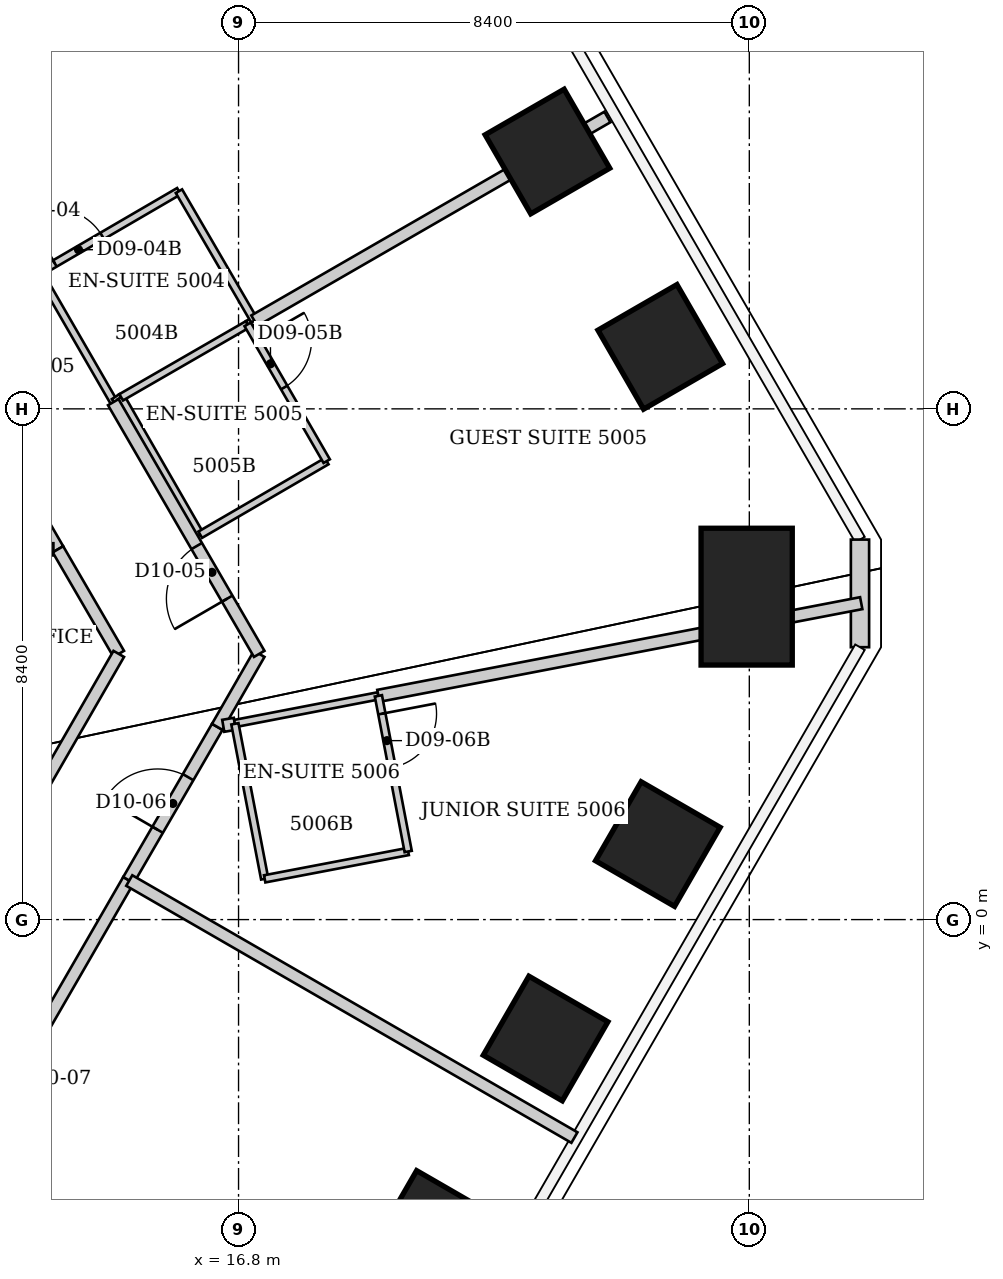
"""IFC4 building model, lengths in metres.
Left out: names, types, materials, properties, quantities, classifications, styles, units other than length and angle.
Written with IfcOpenShell. Run it as: python <this file> out.ifc"""

import sys

from ifc_helpers import new_model, si_unit, direction, frame, frame_2d, origin, origin_2d, place, context, subcontext, project, spatial, rectangle, extrude, element, fill, save


model = new_model("IFC4")
c1 = context("Model", 3, precision=1e-05, world=origin(), true_north=direction((0.0, 1.0)))
c2 = subcontext(c1, "Body", "Model", "MODEL_VIEW")
j1 = project(units=[si_unit("LENGTHUNIT", "METRE"), si_unit("PLANEANGLEUNIT", "RADIAN")], contexts=[c1])
p1 = place(None, origin())
s1 = spatial("IfcSite", under=j1, at=p1, CompositionType="ELEMENT")
p2 = place(p1, origin())
s2 = spatial("IfcBuilding", under=s1, at=p2, CompositionType="ELEMENT")
p3 = place(p2, frame((0.0, 0.0, 202.2)))
s3 = spatial("IfcBuildingStorey", under=s2, at=p3, CompositionType="ELEMENT", Elevation=202.2)
for number, where, z_axis, x_axis in (
    (1, (21.88, 12.633, 0.0), (0.0, 0.0, 1.0), (0.866, 0.5, 0.0)),
    (2, (23.735, 9.419, 0.0), (0.0, 0.0, 1.0), (0.866, 0.5, 0.0)),
):
    element("IfcColumn", number, at=place(p3, frame(where, z_axis=z_axis, x_axis=x_axis)), inside=s3, PredefinedType="COLUMN", context=c2, shape_type="SweptSolid", body=[
        extrude(rectangle(XDim=1.5, YDim=1.5, at=origin_2d()), origin(), (0.0, 0.0, 1.0), 3.8),
    ])
p4 = place(p3, frame((25.156, 5.311, 0.0), z_axis=(0.0, 0.0, 1.0), x_axis=(1.0, 0.0, 0.0)))
e3 = element("IfcColumn", 3, at=p4, inside=s3, PredefinedType="COLUMN", context=c2, shape_type="SweptSolid", body=[
    extrude(rectangle(XDim=1.5, YDim=2.25, at=origin_2d()), origin(), (0.0, 0.0, 1.0), 3.8),
])
for number, where, z_axis, x_axis in (
    (4, (23.696, 1.242, 0.0), (0.0, 0.0, 1.0), (0.866, -0.5, 0.0)),
    (5, (21.85, -1.956, 0.0), (0.0, 0.0, 1.0), (0.866, -0.5, 0.0)),
    (6, (20.003, -5.153, 0.0), (0.0, 0.0, 1.0), (0.866, -0.5, 0.0)),
):
    element("IfcColumn", number, at=place(p3, frame(where, z_axis=z_axis, x_axis=x_axis)), inside=s3, PredefinedType="COLUMN", context=c2, shape_type="SweptSolid", body=[
        extrude(rectangle(XDim=1.5, YDim=1.5, at=origin_2d()), origin(), (0.0, 0.0, 1.0), 3.8),
    ])
p5 = place(p3, frame((27.02, 6.25, 0.0), z_axis=(0.0, 0.0, 1.0), x_axis=(0.0, -1.0, 0.0)))
e7 = element("IfcWall", 7, at=p5, inside=s3, PredefinedType="SOLIDWALL", context=c2, shape_type="SweptSolid", body=[
    extrude(rectangle(XDim=1.77, YDim=0.3, at=frame_2d((0.885, 0.0))), origin(), (0.0, 0.0, 1.0), 3.64),
])
p6 = place(p3, frame((11.04, 12.751, 0.0), z_axis=(0.0, 0.0, 1.0), x_axis=(0.654384042683, 0.756162366613, 0.0)))
e8 = element("IfcWall", 8, at=p6, inside=s3, PredefinedType="PARTITIONING", context=c2, shape_type="SweptSolid", body=[
    extrude(rectangle(XDim=10.667, YDim=0.2, at=frame_2d((5.333, 0.0))), origin(), (0.0, 0.0, 1.0), 3.64),
])
p7 = place(p3, frame((11.19, 10.66, 0.0), z_axis=(0.0, 0.0, 1.0), x_axis=(0.500248310865, -0.865881993967, 0.0)))
e9 = element("IfcWall", 9, at=p7, inside=s3, PredefinedType="PARTITIONING", context=c2, shape_type="SweptSolid", body=[
    extrude(rectangle(XDim=5.278, YDim=0.2, at=frame_2d((2.639, 0.0))), origin(), (0.0, 0.0, 1.0), 3.64),
])
p8 = place(p7, frame((2.089, 0.0, 0.0)))
e10 = element("IfcOpeningElement", 10, at=p8, cuts=e9, PredefinedType="OPENING", context=c2, shape_type="SweptSolid", body=[
    extrude(rectangle(XDim=1.1, YDim=2.2, at=frame_2d((0.55, 1.1))), frame((0.0, 0.1, 0.0), z_axis=(0.0, -1.0, 0.0), x_axis=(1.0, 0.0, 0.0)), (0.0, 0.0, 1.0), 0.2),
])
p9 = place(p3, frame((11.22, -5.88, 0.0), z_axis=(0.0, 0.0, 1.0), x_axis=(0.500004606796, 0.866022744033, 0.0)))
e11 = element("IfcWall", 11, at=p9, inside=s3, PredefinedType="PARTITIONING", context=c2, shape_type="SweptSolid", body=[
    extrude(rectangle(XDim=7.54, YDim=0.2, at=frame_2d((3.77, 0.0))), origin(), (0.0, 0.0, 1.0), 3.64),
])
p10 = place(p9, frame((3.27, 0.0, 0.0)))
e12 = element("IfcOpeningElement", 12, at=p10, cuts=e11, PredefinedType="OPENING", context=c2, shape_type="SweptSolid", body=[
    extrude(rectangle(XDim=1.0, YDim=2.13, at=frame_2d((0.5, 1.065))), frame((0.0, 0.1, 0.0), z_axis=(0.0, -1.0, 0.0), x_axis=(1.0, 0.0, 0.0)), (0.0, 0.0, 1.0), 0.2),
])
p11 = place(p3, frame((13.52, 10.64, 0.0), z_axis=(0.0, 0.0, 1.0), x_axis=(0.500046071023, -0.865998803033, 0.0)))
e13 = element("IfcWall", 13, at=p11, inside=s3, PredefinedType="PARTITIONING", context=c2, shape_type="SweptSolid", body=[
    extrude(rectangle(XDim=2.46, YDim=0.12, at=frame_2d((1.23, 0.0))), origin(), (0.0, 0.0, 1.0), 3.64),
])
p12 = place(p3, frame((13.755, 6.09, 0.0), z_axis=(0.0, 0.0, 1.0), x_axis=(-1.0, 0.0, 0.0)))
e14 = element("IfcWall", 14, at=p12, inside=s3, PredefinedType="PARTITIONING", context=c2, shape_type="SweptSolid", body=[
    extrude(rectangle(XDim=3.195, YDim=0.2, at=frame_2d((1.597, 0.0))), origin(), (0.0, 0.0, 1.0), 3.64),
])
p13 = place(p3, frame((13.83, 6.09, 0.0), z_axis=(0.0, 0.0, 1.0), x_axis=(0.502573539539, -0.864534462792, 0.0)))
e15 = element("IfcWall", 15, at=p13, inside=s3, PredefinedType="PARTITIONING", context=c2, shape_type="SweptSolid", body=[
    extrude(rectangle(XDim=1.99, YDim=0.2, at=frame_2d((0.995, 0.0))), origin(), (0.0, 0.0, 1.0), 3.64),
])
p14 = place(p3, frame((14.75, 8.51, 0.0), z_axis=(0.0, 0.0, 1.0), x_axis=(0.831528837533, 0.555481585969, 0.0)))
e16 = element("IfcWall", 16, at=p14, inside=s3, PredefinedType="PARTITIONING", context=c2, shape_type="SweptSolid", body=[
    extrude(rectangle(XDim=0.144, YDim=0.12, at=frame_2d((0.072, 0.0))), origin(), (0.0, 0.0, 1.0), 3.64),
])
p15 = place(p3, frame((14.83, 4.37, 0.0), z_axis=(0.0, 0.0, 1.0), x_axis=(-0.498775186059, -0.866731396554, 0.0)))
e17 = element("IfcWall", 17, at=p15, inside=s3, PredefinedType="PARTITIONING", context=c2, shape_type="SweptSolid", body=[
    extrude(rectangle(XDim=3.288, YDim=0.2, at=frame_2d((1.644, 0.0))), origin(), (0.0, 0.0, 1.0), 3.64),
])
p16 = place(p3, frame((14.87, 8.59, 0.0), z_axis=(0.0, 0.0, 1.0), x_axis=(0.498557331759, -0.866856728041, 0.0)))
e18 = element("IfcWall", 18, at=p16, inside=s3, PredefinedType="PARTITIONING", context=c2, shape_type="SweptSolid", body=[
    extrude(rectangle(XDim=2.607, YDim=0.12, at=frame_2d((1.304, 0.0))), origin(), (0.0, 0.0, 1.0), 3.64),
])
p17 = place(p3, frame((14.87, 8.59, 0.0), z_axis=(0.0, 0.0, 1.0), x_axis=(0.866177122335, 0.499737123639, 0.0)))
e19 = element("IfcWall", 19, at=p17, inside=s3, PredefinedType="PARTITIONING", context=c2, shape_type="SweptSolid", body=[
    extrude(rectangle(XDim=2.401, YDim=0.12, at=frame_2d((1.201, 0.0))), origin(), (0.0, 0.0, 1.0), 2.878),
])
p18 = place(p3, frame((14.99, 0.65, 0.0), z_axis=(0.0, 0.0, 1.0), x_axis=(0.501330358107, 0.865255957529, 0.0)))
e20 = element("IfcWall", 20, at=p18, inside=s3, PredefinedType="PARTITIONING", context=c2, shape_type="SweptSolid", body=[
    extrude(rectangle(XDim=2.912, YDim=0.2, at=frame_2d((1.456, 0.0))), origin(), (0.0, 0.0, 1.0), 3.64),
])
p19 = place(p18, frame((0.956, 0.0, 0.0)))
e21 = element("IfcOpeningElement", 21, at=p19, cuts=e20, PredefinedType="OPENING", context=c2, shape_type="SweptSolid", body=[
    extrude(rectangle(XDim=1.0, YDim=2.13, at=frame_2d((0.5, 1.065))), frame((0.0, 0.1, 0.0), z_axis=(0.0, -1.0, 0.0), x_axis=(1.0, 0.0, 0.0)), (0.0, 0.0, 1.0), 0.2),
])
p20 = place(p3, frame((15.82, 11.98, 0.0), z_axis=(0.0, 0.0, 1.0), x_axis=(-0.864041571379, -0.503420463359, 0.0)))
e22 = element("IfcWall", 22, at=p20, inside=s3, PredefinedType="PARTITIONING", context=c2, shape_type="SweptSolid", body=[
    extrude(rectangle(XDim=2.662, YDim=0.12, at=frame_2d((1.331, 0.0))), origin(), (0.0, 0.0, 1.0), 3.64),
])
p21 = place(p20, frame((1.462, 0.0, 0.0)))
e23 = element("IfcOpeningElement", 23, at=p21, cuts=e22, PredefinedType="OPENING", context=c2, shape_type="SweptSolid", body=[
    extrude(rectangle(XDim=0.9, YDim=2.03, at=frame_2d((0.45, 1.015))), frame((0.0, 0.06, 0.0), z_axis=(0.0, -1.0, 0.0), x_axis=(1.0, 0.0, 0.0)), (0.0, 0.0, 1.0), 0.12),
])
p22 = place(p3, frame((16.17, 6.33, 0.0), z_axis=(0.0, 0.0, 1.0), x_axis=(0.864396442809, 0.502810888564, 0.0)))
e24 = element("IfcWall", 24, at=p22, inside=s3, PredefinedType="PARTITIONING", context=c2, shape_type="SweptSolid", body=[
    extrude(rectangle(XDim=2.406, YDim=0.12, at=frame_2d((1.203, 0.0))), origin(), (0.0, 0.0, 1.0), 3.64),
])
p23 = place(p3, frame((16.45, 3.17, 0.0), z_axis=(0.0, 0.0, 1.0), x_axis=(0.49845455473, 0.866915830325, 0.0)))
e25 = element("IfcWall", 25, at=p23, inside=s3, PredefinedType="PARTITIONING", context=c2, shape_type="SweptSolid", body=[
    extrude(rectangle(XDim=1.384, YDim=0.2, at=frame_2d((0.692, 0.0))), origin(), (0.0, 0.0, 1.0), 3.64),
])
p24 = place(p3, frame((16.549, 3.187, 0.0), z_axis=(0.0, 0.0, 1.0), x_axis=(0.985496381106, 0.169696443175, 0.0)))
e26 = element("IfcWall", 26, at=p24, inside=s3, PredefinedType="PARTITIONING", context=c2, shape_type="SweptSolid", body=[
    extrude(rectangle(XDim=0.194, YDim=0.2, at=frame_2d((0.097, 0.0))), origin(), (0.0, 0.0, 1.0), 3.64),
])
p25 = place(p3, frame((16.739, 3.225, 0.0), z_axis=(0.0, 0.0, 1.0), x_axis=(0.981946287277, 0.189159955868, 0.0)))
e27 = element("IfcWall", 27, at=p25, inside=s3, PredefinedType="PARTITIONING", context=c2, shape_type="SweptSolid", body=[
    extrude(rectangle(XDim=2.405, YDim=0.12, at=frame_2d((1.202, 0.0))), origin(), (0.0, 0.0, 1.0), 3.64),
])
p26 = place(p3, frame((16.74, 3.22, 0.0), z_axis=(0.0, 0.0, 1.0), x_axis=(0.188697442844, -0.982035271802, 0.0)))
e28 = element("IfcWall", 28, at=p26, inside=s3, PredefinedType="PARTITIONING", context=c2, shape_type="SweptSolid", body=[
    extrude(rectangle(XDim=2.597, YDim=0.12, at=frame_2d((1.298, 0.0))), origin(), (0.0, 0.0, 1.0), 3.64),
])
p27 = place(p3, frame((16.95, 9.79, 0.0), z_axis=(0.0, 0.0, 1.0), x_axis=(0.877895572914, 0.478852130681, 0.0)))
e29 = element("IfcWall", 29, at=p27, inside=s3, PredefinedType="PARTITIONING", context=c2, shape_type="SweptSolid", body=[
    extrude(rectangle(XDim=0.125, YDim=0.12, at=frame_2d((0.063, 0.0))), origin(), (0.0, 0.0, 1.0), 3.64),
])
p28 = place(p3, frame((17.06, 9.85, 0.0), z_axis=(0.0, 0.0, 1.0), x_axis=(-0.503131731744, 0.864209731785, 0.0)))
e30 = element("IfcWall", 30, at=p28, inside=s3, PredefinedType="PARTITIONING", context=c2, shape_type="SweptSolid", body=[
    extrude(rectangle(XDim=2.465, YDim=0.12, at=frame_2d((1.232, 0.0))), origin(), (0.0, 0.0, 1.0), 3.64),
])
p29 = place(p3, frame((17.06, 9.85, 0.0), z_axis=(0.0, 0.0, 1.0), x_axis=(0.866166787958, 0.499755035431, 0.0)))
e31 = element("IfcWall", 31, at=p29, inside=s3, PredefinedType="PARTITIONING", context=c2, shape_type="SweptSolid", body=[
    extrude(rectangle(XDim=6.703, YDim=0.2, at=frame_2d((3.352, 0.0))), origin(), (0.0, 0.0, 1.0), 2.878),
])
p30 = place(p3, frame((17.14, 4.37, 0.0), z_axis=(0.0, 0.0, 1.0), x_axis=(-0.501524901322, 0.865143209737, 0.0)))
e32 = element("IfcWall", 32, at=p30, inside=s3, PredefinedType="PARTITIONING", context=c2, shape_type="SweptSolid", body=[
    extrude(rectangle(XDim=4.785, YDim=0.2, at=frame_2d((2.393, 0.0))), origin(), (0.0, 0.0, 1.0), 3.64),
])
p31 = place(p30, frame((1.05, 0.0, 0.0)))
e33 = element("IfcOpeningElement", 33, at=p31, cuts=e32, PredefinedType="OPENING", context=c2, shape_type="SweptSolid", body=[
    extrude(rectangle(XDim=1.0, YDim=2.13, at=frame_2d((0.5, 1.065))), frame((0.0, 0.1, 0.0), z_axis=(0.0, -1.0, 0.0), x_axis=(1.0, 0.0, 0.0)), (0.0, 0.0, 1.0), 0.2),
])
p32 = place(p3, frame((17.23, 0.67, 0.0), z_axis=(0.0, 0.0, 1.0), x_axis=(0.982288725898, 0.187373581313, 0.0)))
e34 = element("IfcWall", 34, at=p32, inside=s3, PredefinedType="PARTITIONING", context=c2, shape_type="SweptSolid", body=[
    extrude(rectangle(XDim=2.403, YDim=0.12, at=frame_2d((1.201, 0.0))), origin(), (0.0, 0.0, 1.0), 3.64),
])
p33 = place(p3, frame((18.25, 7.54, 0.0), z_axis=(0.0, 0.0, 1.0), x_axis=(-0.500291685314, 0.865856933682, 0.0)))
e35 = element("IfcWall", 35, at=p33, inside=s3, PredefinedType="PARTITIONING", context=c2, shape_type="SweptSolid", body=[
    extrude(rectangle(XDim=2.599, YDim=0.12, at=frame_2d((1.299, 0.0))), origin(), (0.0, 0.0, 1.0), 3.64),
])
p34 = place(p33, frame((1.399, 0.0, 0.0)))
e36 = element("IfcOpeningElement", 36, at=p34, cuts=e35, PredefinedType="OPENING", context=c2, shape_type="SweptSolid", body=[
    extrude(rectangle(XDim=0.9, YDim=2.03, at=frame_2d((0.45, 1.015))), frame((0.0, 0.06, 0.0), z_axis=(0.0, -1.0, 0.0), x_axis=(1.0, 0.0, 0.0)), (0.0, 0.0, 1.0), 0.12),
])
p35 = place(p3, frame((19.1, 3.68, 0.0), z_axis=(0.0, 0.0, 1.0), x_axis=(0.982065840923, 0.188538282829, 0.0)))
e37 = element("IfcWall", 37, at=p35, inside=s3, PredefinedType="PARTITIONING", context=c2, shape_type="SweptSolid", body=[
    extrude(rectangle(XDim=8.085, YDim=0.2, at=frame_2d((4.043, 0.0))), origin(), (0.0, 0.0, 1.0), 3.64),
])
p36 = place(p3, frame((19.59, 1.12, 0.0), z_axis=(0.0, 0.0, 1.0), x_axis=(-0.188003058159, 0.982168442846, 0.0)))
e38 = element("IfcWall", 38, at=p36, inside=s3, PredefinedType="PARTITIONING", context=c2, shape_type="SweptSolid", body=[
    extrude(rectangle(XDim=2.606, YDim=0.12, at=frame_2d((1.303, 0.0))), origin(), (0.0, 0.0, 1.0), 3.64),
])
p37 = place(p36, frame((1.406, 0.0, 0.0)))
e39 = element("IfcOpeningElement", 39, at=p37, cuts=e38, PredefinedType="OPENING", context=c2, shape_type="SweptSolid", body=[
    extrude(rectangle(XDim=0.9, YDim=2.03, at=frame_2d((0.45, 1.015))), frame((0.0, 0.06, 0.0), z_axis=(0.0, -1.0, 0.0), x_axis=(1.0, 0.0, 0.0)), (0.0, 0.0, 1.0), 0.12),
])
p38 = place(p3, frame((22.324, -3.585, 0.0), z_axis=(0.0, 0.0, 1.0), x_axis=(-0.865987918257, 0.500064921217, 0.0)))
e40 = element("IfcWall", 40, at=p38, inside=s3, PredefinedType="PARTITIONING", context=c2, shape_type="SweptSolid", body=[
    extrude(rectangle(XDim=8.454, YDim=0.2, at=frame_2d((4.227, 0.0))), origin(), (0.0, 0.0, 1.0), 3.64),
])
p39 = place(p21, origin())
e41 = element("IfcDoor", 41, at=p39, inside=s3, OperationType="SINGLE_SWING_RIGHT", PredefinedType="DOOR", context=c2, shape_type="SweptSolid", body=[
    extrude(rectangle(XDim=0.9, YDim=2.03, at=frame_2d((0.45, 1.015))), frame((0.0, 0.025, 0.0), z_axis=(0.0, -1.0, 0.0), x_axis=(1.0, 0.0, 0.0)), (0.0, 0.0, 1.0), 0.05),
])
fill(e23, e41)
p40 = place(p31, origin())
e42 = element("IfcDoor", 42, at=p40, inside=s3, OperationType="SINGLE_SWING_LEFT", PredefinedType="DOOR", context=c2, shape_type="SweptSolid", body=[
    extrude(rectangle(XDim=1.0, YDim=2.13, at=frame_2d((0.5, 1.065))), frame((0.0, 0.025, 0.0), z_axis=(0.0, -1.0, 0.0), x_axis=(1.0, 0.0, 0.0)), (0.0, 0.0, 1.0), 0.05),
])
fill(e33, e42)
p41 = place(p34, origin())
e43 = element("IfcDoor", 43, at=p41, inside=s3, OperationType="SINGLE_SWING_RIGHT", PredefinedType="DOOR", context=c2, shape_type="SweptSolid", body=[
    extrude(rectangle(XDim=0.9, YDim=2.03, at=frame_2d((0.45, 1.015))), frame((0.0, 0.025, 0.0), z_axis=(0.0, -1.0, 0.0), x_axis=(1.0, 0.0, 0.0)), (0.0, 0.0, 1.0), 0.05),
])
fill(e36, e43)
p42 = place(p19, origin())
e44 = element("IfcDoor", 44, at=p42, inside=s3, OperationType="SINGLE_SWING_LEFT", PredefinedType="DOOR", context=c2, shape_type="SweptSolid", body=[
    extrude(rectangle(XDim=1.0, YDim=2.13, at=frame_2d((0.5, 1.065))), frame((0.0, 0.025, 0.0), z_axis=(0.0, -1.0, 0.0), x_axis=(1.0, 0.0, 0.0)), (0.0, 0.0, 1.0), 0.05),
])
fill(e21, e44)
p43 = place(p37, origin())
e45 = element("IfcDoor", 45, at=p43, inside=s3, OperationType="SINGLE_SWING_RIGHT", PredefinedType="DOOR", context=c2, shape_type="SweptSolid", body=[
    extrude(rectangle(XDim=0.9, YDim=2.03, at=frame_2d((0.45, 1.015))), frame((0.0, 0.025, 0.0), z_axis=(0.0, -1.0, 0.0), x_axis=(1.0, 0.0, 0.0)), (0.0, 0.0, 1.0), 0.05),
])
fill(e39, e45)
save(model, sys.argv[1])
